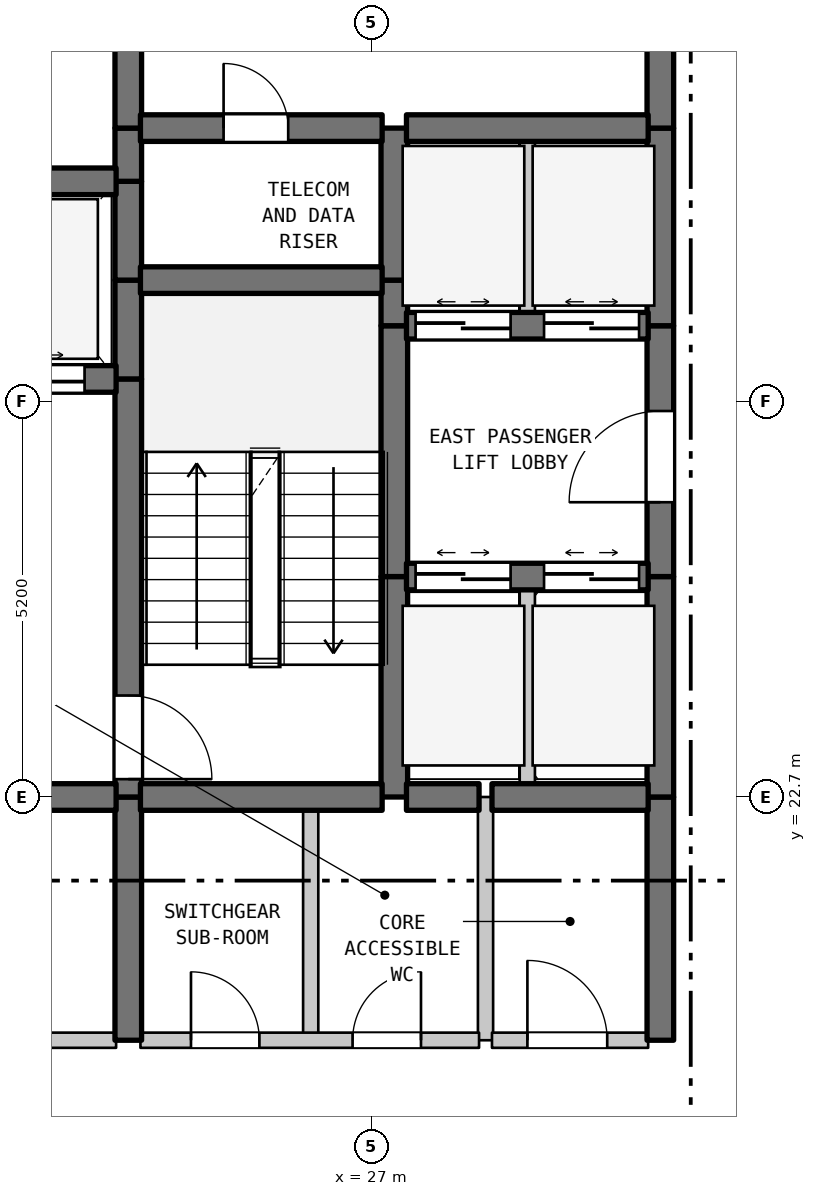
"""IFC4 building model, lengths in metres.
Left out: names, types, materials, properties, quantities, classifications, styles, units other than length and angle.
Written with IfcOpenShell. Run it as: python <this file> out.ifc"""

import sys

from ifc_helpers import new_model, si_unit, direction, frame, frame_2d, origin, place, context, subcontext, project, spatial, rectangle, extrude, element, fill, save


model = new_model("IFC4")
c1 = context("Model", 3, precision=1e-05, world=origin(), true_north=direction((0.0, 1.0)))
c2 = subcontext(c1, "Body", "Model", "MODEL_VIEW")
j1 = project(units=[si_unit("LENGTHUNIT", "METRE"), si_unit("PLANEANGLEUNIT", "RADIAN")], contexts=[c1])
p1 = place(None, origin())
s1 = spatial("IfcSite", under=j1, at=p1, CompositionType="ELEMENT")
p2 = place(p1, origin())
s2 = spatial("IfcBuilding", under=s1, at=p2, CompositionType="ELEMENT")
p3 = place(p2, frame((0.0, 0.0, 155.7)))
s3 = spatial("IfcBuildingStorey", under=s2, at=p3, CompositionType="ELEMENT", Elevation=155.7)
p4 = place(p3, frame((23.8, 19.5, 0.0), z_axis=(0.0, 0.0, 1.0), x_axis=(0.0, 1.0, 0.0)))
e1 = element("IfcWall", 1, at=p4, inside=s3, PredefinedType="SHEAR", context=c2, shape_type="SweptSolid", body=[
    extrude(rectangle(XDim=3.2, YDim=0.35, at=frame_2d((1.6, 0.0))), origin(), (0.0, 0.0, 1.0), 3.28),
])
p5 = place(p3, frame((23.8, 22.7, 0.0), z_axis=(0.0, 0.0, 1.0), x_axis=(0.0, 1.0, 0.0)))
e2 = element("IfcWall", 2, at=p5, inside=s3, PredefinedType="SHEAR", context=c2, shape_type="SweptSolid", body=[
    extrude(rectangle(XDim=5.5, YDim=0.35, at=frame_2d((2.75, 0.0))), origin(), (0.0, 0.0, 1.0), 3.28),
])
p6 = place(p5, frame((0.235, 0.0, 0.0)))
e3 = element("IfcOpeningElement", 3, at=p6, cuts=e2, PredefinedType="OPENING", context=c2, shape_type="SweptSolid", body=[
    extrude(rectangle(XDim=1.1, YDim=2.15, at=frame_2d((0.55, 1.075))), frame((0.0, 0.185, 0.0), z_axis=(0.0, -1.0, 0.0), x_axis=(1.0, 0.0, 0.0)), (0.0, 0.0, 1.0), 0.37),
])
for number, where, z_axis, x_axis in (
    (4, (23.8, 28.2, 0.0), (0.0, 0.0, 1.0), (0.0, 1.0, 0.0)),
    (5, (23.8, 29.5, 0.0), (0.0, 0.0, 1.0), (0.0, 1.0, 0.0)),
):
    element("IfcWall", number, at=place(p3, frame(where, z_axis=z_axis, x_axis=x_axis)), inside=s3, PredefinedType="SHEAR", context=c2, shape_type="SweptSolid", body=[
        extrude(rectangle(XDim=1.3, YDim=0.35, at=frame_2d((0.65, 0.0))), origin(), (0.0, 0.0, 1.0), 3.28),
    ])
p7 = place(p3, frame((23.8, 30.8, 0.0), z_axis=(0.0, 0.0, 1.0), x_axis=(0.0, 1.0, 0.0)))
e6 = element("IfcWall", 6, at=p7, inside=s3, PredefinedType="SHEAR", context=c2, shape_type="SweptSolid", body=[
    extrude(rectangle(XDim=0.7, YDim=0.35, at=frame_2d((0.35, 0.0))), origin(), (0.0, 0.0, 1.0), 3.28),
])
p8 = place(p3, frame((23.8, 31.5, 0.0), z_axis=(0.0, 0.0, 1.0), x_axis=(0.0, 1.0, 0.0)))
e7 = element("IfcWall", 7, at=p8, inside=s3, PredefinedType="SHEAR", context=c2, shape_type="SweptSolid", body=[
    extrude(rectangle(XDim=3.5, YDim=0.35, at=frame_2d((1.75, 0.0))), origin(), (0.0, 0.0, 1.0), 3.28),
])
p9 = place(p8, frame((1.127, 0.0, 0.0)))
e8 = element("IfcOpeningElement", 8, at=p9, cuts=e7, PredefinedType="OPENING", context=c2, shape_type="SweptSolid", body=[
    extrude(rectangle(XDim=1.1, YDim=2.15, at=frame_2d((0.55, 1.075))), frame((0.0, 0.185, 0.0), z_axis=(0.0, -1.0, 0.0), x_axis=(1.0, 0.0, 0.0)), (0.0, 0.0, 1.0), 0.37),
])
p10 = place(p3, frame((26.2, 19.5, 0.0), z_axis=(0.0, 0.0, 1.0), x_axis=(0.0, 1.0, 0.0)))
e9 = element("IfcWall", 9, at=p10, inside=s3, PredefinedType="STANDARD", context=c2, shape_type="SweptSolid", body=[
    extrude(rectangle(XDim=3.2, YDim=0.2, at=frame_2d((1.6, 0.0))), origin(), (0.0, 0.0, 1.0), 3.28),
])
p11 = place(p3, frame((27.3, 22.7, 0.0), z_axis=(0.0, 0.0, 1.0), x_axis=(0.0, 1.0, 0.0)))
e10 = element("IfcWall", 10, at=p11, inside=s3, PredefinedType="SHEAR", context=c2, shape_type="SweptSolid", body=[
    extrude(rectangle(XDim=2.9, YDim=0.35, at=frame_2d((1.45, 0.0))), origin(), (0.0, 0.0, 1.0), 3.28),
])
p12 = place(p3, frame((27.3, 25.6, 0.0), z_axis=(0.0, 0.0, 1.0), x_axis=(0.0, 1.0, 0.0)))
e11 = element("IfcWall", 11, at=p12, inside=s3, PredefinedType="SHEAR", context=c2, shape_type="SweptSolid", body=[
    extrude(rectangle(XDim=3.3, YDim=0.35, at=frame_2d((1.65, 0.0))), origin(), (0.0, 0.0, 1.0), 3.28),
])
p13 = place(p3, frame((27.3, 28.9, 0.0), z_axis=(0.0, 0.0, 1.0), x_axis=(0.0, 1.0, 0.0)))
e12 = element("IfcWall", 12, at=p13, inside=s3, PredefinedType="SHEAR", context=c2, shape_type="SweptSolid", body=[
    extrude(rectangle(XDim=0.6, YDim=0.35, at=frame_2d((0.3, 0.0))), origin(), (0.0, 0.0, 1.0), 3.28),
])
p14 = place(p3, frame((27.3, 29.5, 0.0), z_axis=(0.0, 0.0, 1.0), x_axis=(0.0, 1.0, 0.0)))
e13 = element("IfcWall", 13, at=p14, inside=s3, PredefinedType="SHEAR", context=c2, shape_type="SweptSolid", body=[
    extrude(rectangle(XDim=2.0, YDim=0.35, at=frame_2d((1.0, 0.0))), origin(), (0.0, 0.0, 1.0), 3.28),
])
p15 = place(p3, frame((28.5, 19.5, 0.0), z_axis=(0.0, 0.0, 1.0), x_axis=(0.0, 1.0, 0.0)))
e14 = element("IfcWall", 14, at=p15, inside=s3, PredefinedType="STANDARD", context=c2, shape_type="SweptSolid", body=[
    extrude(rectangle(XDim=3.2, YDim=0.2, at=frame_2d((1.6, 0.0))), origin(), (0.0, 0.0, 1.0), 3.28),
])
p16 = place(p3, frame((29.05, 22.7, 0.0), z_axis=(0.0, 0.0, 1.0), x_axis=(0.0, 1.0, 0.0)))
e15 = element("IfcWall", 15, at=p16, inside=s3, PredefinedType="STANDARD", context=c2, shape_type="SweptSolid", body=[
    extrude(rectangle(XDim=2.9, YDim=0.2, at=frame_2d((1.45, 0.0))), origin(), (0.0, 0.0, 1.0), 3.28),
])
p17 = place(p3, frame((29.05, 28.9, 0.0), z_axis=(0.0, 0.0, 1.0), x_axis=(0.0, 1.0, 0.0)))
e16 = element("IfcWall", 16, at=p17, inside=s3, PredefinedType="STANDARD", context=c2, shape_type="SweptSolid", body=[
    extrude(rectangle(XDim=2.6, YDim=0.2, at=frame_2d((1.3, 0.0))), origin(), (0.0, 0.0, 1.0), 3.28),
])
p18 = place(p3, frame((30.8, 19.5, 0.0), z_axis=(0.0, 0.0, 1.0), x_axis=(0.0, 1.0, 0.0)))
e17 = element("IfcWall", 17, at=p18, inside=s3, PredefinedType="SHEAR", context=c2, shape_type="SweptSolid", body=[
    extrude(rectangle(XDim=3.2, YDim=0.35, at=frame_2d((1.6, 0.0))), origin(), (0.0, 0.0, 1.0), 3.28),
])
p19 = place(p3, frame((30.8, 22.7, 0.0), z_axis=(0.0, 0.0, 1.0), x_axis=(0.0, 1.0, 0.0)))
e18 = element("IfcWall", 18, at=p19, inside=s3, PredefinedType="SHEAR", context=c2, shape_type="SweptSolid", body=[
    extrude(rectangle(XDim=2.9, YDim=0.35, at=frame_2d((1.45, 0.0))), origin(), (0.0, 0.0, 1.0), 3.28),
])
p20 = place(p3, frame((30.8, 25.6, 0.0), z_axis=(0.0, 0.0, 1.0), x_axis=(0.0, 1.0, 0.0)))
e19 = element("IfcWall", 19, at=p20, inside=s3, PredefinedType="SHEAR", context=c2, shape_type="SweptSolid", body=[
    extrude(rectangle(XDim=3.3, YDim=0.35, at=frame_2d((1.65, 0.0))), origin(), (0.0, 0.0, 1.0), 3.28),
])
p21 = place(p20, frame((0.978, 0.0, 0.0)))
e20 = element("IfcOpeningElement", 20, at=p21, cuts=e19, PredefinedType="OPENING", context=c2, shape_type="SweptSolid", body=[
    extrude(rectangle(XDim=1.2, YDim=2.2, at=frame_2d((0.6, 1.1))), frame((0.0, 0.185, 0.0), z_axis=(0.0, -1.0, 0.0), x_axis=(1.0, 0.0, 0.0)), (0.0, 0.0, 1.0), 0.37),
])
p22 = place(p3, frame((30.8, 28.9, 0.0), z_axis=(0.0, 0.0, 1.0), x_axis=(0.0, 1.0, 0.0)))
e21 = element("IfcWall", 21, at=p22, inside=s3, PredefinedType="SHEAR", context=c2, shape_type="SweptSolid", body=[
    extrude(rectangle(XDim=2.6, YDim=0.35, at=frame_2d((1.3, 0.0))), origin(), (0.0, 0.0, 1.0), 3.28),
])
p23 = place(p3, frame((30.8, 31.5, 0.0), z_axis=(0.0, 0.0, 1.0), x_axis=(0.0, 1.0, 0.0)))
e22 = element("IfcWall", 22, at=p23, inside=s3, PredefinedType="SHEAR", context=c2, shape_type="SweptSolid", body=[
    extrude(rectangle(XDim=3.5, YDim=0.35, at=frame_2d((1.75, 0.0))), origin(), (0.0, 0.0, 1.0), 3.28),
])
p24 = place(p23, frame((1.15, 0.0, 0.0)))
e23 = element("IfcOpeningElement", 23, at=p24, cuts=e22, PredefinedType="OPENING", context=c2, shape_type="SweptSolid", body=[
    extrude(rectangle(XDim=1.2, YDim=2.2, at=frame_2d((0.6, 1.1))), frame((0.0, 0.185, 0.0), z_axis=(0.0, -1.0, 0.0), x_axis=(1.0, 0.0, 0.0)), (0.0, 0.0, 1.0), 0.37),
])
p25 = place(p3, frame((19.16, 19.5, 0.0), z_axis=(0.0, 0.0, 1.0), x_axis=(1.0, 0.0, 0.0)))
e24 = element("IfcWall", 24, at=p25, inside=s3, PredefinedType="STANDARD", context=c2, shape_type="SweptSolid", body=[
    extrude(rectangle(XDim=4.48, YDim=0.2, at=frame_2d((2.24, 0.0))), origin(), (0.0, 0.0, 1.0), 3.28),
])
p26 = place(p25, frame((1.64, 0.0, 0.0)))
e25 = element("IfcOpeningElement", 25, at=p26, cuts=e24, PredefinedType="OPENING", context=c2, shape_type="SweptSolid", body=[
    extrude(rectangle(XDim=1.2, YDim=2.2, at=frame_2d((0.6, 1.1))), frame((0.0, 0.11, 0.0), z_axis=(0.0, -1.0, 0.0), x_axis=(1.0, 0.0, 0.0)), (0.0, 0.0, 1.0), 0.22),
])
p27 = place(p3, frame((23.96, 19.5, 0.0), z_axis=(0.0, 0.0, 1.0), x_axis=(1.0, 0.0, 0.0)))
e26 = element("IfcWall", 26, at=p27, inside=s3, PredefinedType="STANDARD", context=c2, shape_type="SweptSolid", body=[
    extrude(rectangle(XDim=4.455, YDim=0.2, at=frame_2d((2.228, 0.0))), origin(), (0.0, 0.0, 1.0), 3.28),
])
p28 = place(p27, frame((0.665, 0.0, 0.0)))
e27 = element("IfcOpeningElement", 27, at=p28, cuts=e26, PredefinedType="OPENING", context=c2, shape_type="SweptSolid", body=[
    extrude(rectangle(XDim=0.9, YDim=2.15, at=frame_2d((0.45, 1.075))), frame((0.0, 0.11, 0.0), z_axis=(0.0, -1.0, 0.0), x_axis=(1.0, 0.0, 0.0)), (0.0, 0.0, 1.0), 0.22),
])
p29 = place(p27, frame((2.791, 0.0, 0.0)))
e28 = element("IfcOpeningElement", 28, at=p29, cuts=e26, PredefinedType="OPENING", context=c2, shape_type="SweptSolid", body=[
    extrude(rectangle(XDim=0.9, YDim=2.15, at=frame_2d((0.45, 1.075))), frame((0.0, 0.11, 0.0), z_axis=(0.0, -1.0, 0.0), x_axis=(1.0, 0.0, 0.0)), (0.0, 0.0, 1.0), 0.22),
])
p30 = place(p3, frame((28.585, 19.5, 0.0), z_axis=(0.0, 0.0, 1.0), x_axis=(1.0, 0.0, 0.0)))
e29 = element("IfcWall", 29, at=p30, inside=s3, PredefinedType="STANDARD", context=c2, shape_type="SweptSolid", body=[
    extrude(rectangle(XDim=2.055, YDim=0.2, at=frame_2d((1.027, 0.0))), origin(), (0.0, 0.0, 1.0), 3.28),
])
p31 = place(p30, frame((0.466, 0.0, 0.0)))
e30 = element("IfcOpeningElement", 30, at=p31, cuts=e29, PredefinedType="OPENING", context=c2, shape_type="SweptSolid", body=[
    extrude(rectangle(XDim=1.05, YDim=2.15, at=frame_2d((0.525, 1.075))), frame((0.0, 0.11, 0.0), z_axis=(0.0, -1.0, 0.0), x_axis=(1.0, 0.0, 0.0)), (0.0, 0.0, 1.0), 0.22),
])
p32 = place(p3, frame((19.16, 22.7, 0.0), z_axis=(0.0, 0.0, 1.0), x_axis=(1.0, 0.0, 0.0)))
e31 = element("IfcWall", 31, at=p32, inside=s3, PredefinedType="SHEAR", context=c2, shape_type="SweptSolid", body=[
    extrude(rectangle(XDim=4.48, YDim=0.35, at=frame_2d((2.24, 0.0))), origin(), (0.0, 0.0, 1.0), 3.28),
])
p33 = place(p32, frame((1.64, 0.0, 0.0)))
e32 = element("IfcOpeningElement", 32, at=p33, cuts=e31, PredefinedType="OPENING", context=c2, shape_type="SweptSolid", body=[
    extrude(rectangle(XDim=1.2, YDim=2.2, at=frame_2d((0.6, 1.1))), frame((0.0, 0.185, 0.0), z_axis=(0.0, -1.0, 0.0), x_axis=(1.0, 0.0, 0.0)), (0.0, 0.0, 1.0), 0.37),
])
p34 = place(p3, frame((23.96, 22.7, 0.0), z_axis=(0.0, 0.0, 1.0), x_axis=(1.0, 0.0, 0.0)))
e33 = element("IfcWall", 33, at=p34, inside=s3, PredefinedType="SHEAR", context=c2, shape_type="SweptSolid", body=[
    extrude(rectangle(XDim=3.18, YDim=0.35, at=frame_2d((1.59, 0.0))), origin(), (0.0, 0.0, 1.0), 3.28),
])
p35 = place(p3, frame((27.46, 22.7, 0.0), z_axis=(0.0, 0.0, 1.0), x_axis=(1.0, 0.0, 0.0)))
e34 = element("IfcWall", 34, at=p35, inside=s3, PredefinedType="SHEAR", context=c2, shape_type="SweptSolid", body=[
    extrude(rectangle(XDim=0.955, YDim=0.35, at=frame_2d((0.478, 0.0))), origin(), (0.0, 0.0, 1.0), 3.28),
])
p36 = place(p3, frame((28.585, 22.7, 0.0), z_axis=(0.0, 0.0, 1.0), x_axis=(1.0, 0.0, 0.0)))
e35 = element("IfcWall", 35, at=p36, inside=s3, PredefinedType="SHEAR", context=c2, shape_type="SweptSolid", body=[
    extrude(rectangle(XDim=2.055, YDim=0.35, at=frame_2d((1.027, 0.0))), origin(), (0.0, 0.0, 1.0), 3.28),
])
p37 = place(p3, frame((27.46, 25.6, 0.0), z_axis=(0.0, 0.0, 1.0), x_axis=(1.0, 0.0, 0.0)))
e36 = element("IfcWall", 36, at=p37, inside=s3, PredefinedType="SHEAR", context=c2, shape_type="SweptSolid", body=[
    extrude(rectangle(XDim=3.18, YDim=0.35, at=frame_2d((1.59, 0.0))), origin(), (0.0, 0.0, 1.0), 3.28),
])
p38 = place(p37, frame((0.12, 0.0, 0.0)))
e37 = element("IfcOpeningElement", 37, at=p38, cuts=e36, PredefinedType="OPENING", context=c2, shape_type="SweptSolid", body=[
    extrude(rectangle(XDim=1.25, YDim=2.2, at=frame_2d((0.625, 1.1))), frame((0.0, 0.185, 0.0), z_axis=(0.0, -1.0, 0.0), x_axis=(1.0, 0.0, 0.0)), (0.0, 0.0, 1.0), 0.37),
])
p39 = place(p37, frame((1.81, 0.0, 0.0)))
e38 = element("IfcOpeningElement", 38, at=p39, cuts=e36, PredefinedType="OPENING", context=c2, shape_type="SweptSolid", body=[
    extrude(rectangle(XDim=1.25, YDim=2.2, at=frame_2d((0.625, 1.1))), frame((0.0, 0.185, 0.0), z_axis=(0.0, -1.0, 0.0), x_axis=(1.0, 0.0, 0.0)), (0.0, 0.0, 1.0), 0.37),
])
p40 = place(p3, frame((19.16, 28.2, 0.0), z_axis=(0.0, 0.0, 1.0), x_axis=(1.0, 0.0, 0.0)))
e39 = element("IfcWall", 39, at=p40, inside=s3, PredefinedType="SHEAR", context=c2, shape_type="SweptSolid", body=[
    extrude(rectangle(XDim=4.48, YDim=0.35, at=frame_2d((2.24, 0.0))), origin(), (0.0, 0.0, 1.0), 3.28),
])
p41 = place(p40, frame((0.415, 0.0, 0.0)))
e40 = element("IfcOpeningElement", 40, at=p41, cuts=e39, PredefinedType="OPENING", context=c2, shape_type="SweptSolid", body=[
    extrude(rectangle(XDim=1.25, YDim=2.2, at=frame_2d((0.625, 1.1))), frame((0.0, 0.185, 0.0), z_axis=(0.0, -1.0, 0.0), x_axis=(1.0, 0.0, 0.0)), (0.0, 0.0, 1.0), 0.37),
])
p42 = place(p40, frame((2.815, 0.0, 0.0)))
e41 = element("IfcOpeningElement", 41, at=p42, cuts=e39, PredefinedType="OPENING", context=c2, shape_type="SweptSolid", body=[
    extrude(rectangle(XDim=1.25, YDim=2.2, at=frame_2d((0.625, 1.1))), frame((0.0, 0.185, 0.0), z_axis=(0.0, -1.0, 0.0), x_axis=(1.0, 0.0, 0.0)), (0.0, 0.0, 1.0), 0.37),
])
p43 = place(p3, frame((27.46, 28.9, 0.0), z_axis=(0.0, 0.0, 1.0), x_axis=(1.0, 0.0, 0.0)))
e42 = element("IfcWall", 42, at=p43, inside=s3, PredefinedType="SHEAR", context=c2, shape_type="SweptSolid", body=[
    extrude(rectangle(XDim=3.18, YDim=0.35, at=frame_2d((1.59, 0.0))), origin(), (0.0, 0.0, 1.0), 3.28),
])
p44 = place(p43, frame((0.12, 0.0, 0.0)))
e43 = element("IfcOpeningElement", 43, at=p44, cuts=e42, PredefinedType="OPENING", context=c2, shape_type="SweptSolid", body=[
    extrude(rectangle(XDim=1.25, YDim=2.2, at=frame_2d((0.625, 1.1))), frame((0.0, 0.185, 0.0), z_axis=(0.0, -1.0, 0.0), x_axis=(1.0, 0.0, 0.0)), (0.0, 0.0, 1.0), 0.37),
])
p45 = place(p43, frame((1.81, 0.0, 0.0)))
e44 = element("IfcOpeningElement", 44, at=p45, cuts=e42, PredefinedType="OPENING", context=c2, shape_type="SweptSolid", body=[
    extrude(rectangle(XDim=1.25, YDim=2.2, at=frame_2d((0.625, 1.1))), frame((0.0, 0.185, 0.0), z_axis=(0.0, -1.0, 0.0), x_axis=(1.0, 0.0, 0.0)), (0.0, 0.0, 1.0), 0.37),
])
p46 = place(p3, frame((23.96, 29.5, 0.0), z_axis=(0.0, 0.0, 1.0), x_axis=(1.0, 0.0, 0.0)))
e45 = element("IfcWall", 45, at=p46, inside=s3, PredefinedType="SHEAR", context=c2, shape_type="SweptSolid", body=[
    extrude(rectangle(XDim=3.18, YDim=0.35, at=frame_2d((1.59, 0.0))), origin(), (0.0, 0.0, 1.0), 3.28),
])
p47 = place(p3, frame((19.16, 30.8, 0.0), z_axis=(0.0, 0.0, 1.0), x_axis=(1.0, 0.0, 0.0)))
e46 = element("IfcWall", 46, at=p47, inside=s3, PredefinedType="SHEAR", context=c2, shape_type="SweptSolid", body=[
    extrude(rectangle(XDim=4.48, YDim=0.35, at=frame_2d((2.24, 0.0))), origin(), (0.0, 0.0, 1.0), 3.28),
])
p48 = place(p3, frame((23.96, 31.5, 0.0), z_axis=(0.0, 0.0, 1.0), x_axis=(1.0, 0.0, 0.0)))
e47 = element("IfcWall", 47, at=p48, inside=s3, PredefinedType="SHEAR", context=c2, shape_type="SweptSolid", body=[
    extrude(rectangle(XDim=3.18, YDim=0.35, at=frame_2d((1.59, 0.0))), origin(), (0.0, 0.0, 1.0), 3.28),
])
p49 = place(p48, frame((1.094, 0.0, 0.0)))
e48 = element("IfcOpeningElement", 48, at=p49, cuts=e47, PredefinedType="OPENING", context=c2, shape_type="SweptSolid", body=[
    extrude(rectangle(XDim=0.85, YDim=2.1, at=frame_2d((0.425, 1.05))), frame((0.0, 0.185, 0.0), z_axis=(0.0, -1.0, 0.0), x_axis=(1.0, 0.0, 0.0)), (0.0, 0.0, 1.0), 0.37),
])
p50 = place(p3, frame((27.46, 31.5, 0.0), z_axis=(0.0, 0.0, 1.0), x_axis=(1.0, 0.0, 0.0)))
e49 = element("IfcWall", 49, at=p50, inside=s3, PredefinedType="SHEAR", context=c2, shape_type="SweptSolid", body=[
    extrude(rectangle(XDim=3.18, YDim=0.35, at=frame_2d((1.59, 0.0))), origin(), (0.0, 0.0, 1.0), 3.28),
])
p51 = place(p6, frame((1.1, 0.0, 0.0), z_axis=(0.0, 0.0, 1.0), x_axis=(-1.0, 0.0, 0.0)))
e50 = element("IfcDoor", 50, at=p51, inside=s3, OperationType="SINGLE_SWING_LEFT", PredefinedType="DOOR", context=c2, shape_type="SweptSolid", body=[
    extrude(rectangle(XDim=1.1, YDim=2.15, at=frame_2d((0.55, 1.075))), frame((0.0, 0.025, 0.0), z_axis=(0.0, -1.0, 0.0), x_axis=(1.0, 0.0, 0.0)), (0.0, 0.0, 1.0), 0.05),
])
fill(e3, e50)
p52 = place(p21, origin())
e51 = element("IfcDoor", 51, at=p52, inside=s3, OperationType="SINGLE_SWING_LEFT", PredefinedType="DOOR", context=c2, shape_type="SweptSolid", body=[
    extrude(rectangle(XDim=1.2, YDim=2.2, at=frame_2d((0.6, 1.1))), frame((0.0, 0.025, 0.0), z_axis=(0.0, -1.0, 0.0), x_axis=(1.0, 0.0, 0.0)), (0.0, 0.0, 1.0), 0.05),
])
fill(e20, e51)
p53 = place(p28, origin())
e52 = element("IfcDoor", 52, at=p53, inside=s3, OperationType="SINGLE_SWING_LEFT", PredefinedType="DOOR", context=c2, shape_type="SweptSolid", body=[
    extrude(rectangle(XDim=0.9, YDim=2.15, at=frame_2d((0.45, 1.075))), frame((0.0, 0.025, 0.0), z_axis=(0.0, -1.0, 0.0), x_axis=(1.0, 0.0, 0.0)), (0.0, 0.0, 1.0), 0.05),
])
fill(e27, e52)
p54 = place(p29, origin())
e53 = element("IfcDoor", 53, at=p54, inside=s3, OperationType="SINGLE_SWING_RIGHT", PredefinedType="DOOR", context=c2, shape_type="SweptSolid", body=[
    extrude(rectangle(XDim=0.9, YDim=2.15, at=frame_2d((0.45, 1.075))), frame((0.0, 0.025, 0.0), z_axis=(0.0, -1.0, 0.0), x_axis=(1.0, 0.0, 0.0)), (0.0, 0.0, 1.0), 0.05),
])
fill(e28, e53)
p55 = place(p31, origin())
e54 = element("IfcDoor", 54, at=p55, inside=s3, OperationType="SINGLE_SWING_LEFT", PredefinedType="DOOR", context=c2, shape_type="SweptSolid", body=[
    extrude(rectangle(XDim=1.05, YDim=2.15, at=frame_2d((0.525, 1.075))), frame((0.0, 0.025, 0.0), z_axis=(0.0, -1.0, 0.0), x_axis=(1.0, 0.0, 0.0)), (0.0, 0.0, 1.0), 0.05),
])
fill(e30, e54)
p56 = place(p38, origin())
e55 = element("IfcDoor", 55, at=p56, inside=s3, OperationType="DOUBLE_DOOR_SLIDING", PredefinedType="DOOR", context=c2, shape_type="SweptSolid", body=[
    extrude(rectangle(XDim=1.25, YDim=2.2, at=frame_2d((0.625, 1.1))), frame((0.0, 0.025, 0.0), z_axis=(0.0, -1.0, 0.0), x_axis=(1.0, 0.0, 0.0)), (0.0, 0.0, 1.0), 0.05),
])
fill(e37, e55)
p57 = place(p39, origin())
e56 = element("IfcDoor", 56, at=p57, inside=s3, OperationType="DOUBLE_DOOR_SLIDING", PredefinedType="DOOR", context=c2, shape_type="SweptSolid", body=[
    extrude(rectangle(XDim=1.25, YDim=2.2, at=frame_2d((0.625, 1.1))), frame((0.0, 0.025, 0.0), z_axis=(0.0, -1.0, 0.0), x_axis=(1.0, 0.0, 0.0)), (0.0, 0.0, 1.0), 0.05),
])
fill(e38, e56)
p58 = place(p42, origin())
e57 = element("IfcDoor", 57, at=p58, inside=s3, OperationType="DOUBLE_DOOR_SLIDING", PredefinedType="DOOR", context=c2, shape_type="SweptSolid", body=[
    extrude(rectangle(XDim=1.25, YDim=2.2, at=frame_2d((0.625, 1.1))), frame((0.0, 0.025, 0.0), z_axis=(0.0, -1.0, 0.0), x_axis=(1.0, 0.0, 0.0)), (0.0, 0.0, 1.0), 0.05),
])
fill(e41, e57)
p59 = place(p44, origin())
e58 = element("IfcDoor", 58, at=p59, inside=s3, OperationType="DOUBLE_DOOR_SLIDING", PredefinedType="DOOR", context=c2, shape_type="SweptSolid", body=[
    extrude(rectangle(XDim=1.25, YDim=2.2, at=frame_2d((0.625, 1.1))), frame((0.0, 0.025, 0.0), z_axis=(0.0, -1.0, 0.0), x_axis=(1.0, 0.0, 0.0)), (0.0, 0.0, 1.0), 0.05),
])
fill(e43, e58)
p60 = place(p45, origin())
e59 = element("IfcDoor", 59, at=p60, inside=s3, OperationType="DOUBLE_DOOR_SLIDING", PredefinedType="DOOR", context=c2, shape_type="SweptSolid", body=[
    extrude(rectangle(XDim=1.25, YDim=2.2, at=frame_2d((0.625, 1.1))), frame((0.0, 0.025, 0.0), z_axis=(0.0, -1.0, 0.0), x_axis=(1.0, 0.0, 0.0)), (0.0, 0.0, 1.0), 0.05),
])
fill(e44, e59)
p61 = place(p49, origin())
e60 = element("IfcDoor", 60, at=p61, inside=s3, OperationType="SINGLE_SWING_LEFT", PredefinedType="DOOR", context=c2, shape_type="SweptSolid", body=[
    extrude(rectangle(XDim=0.85, YDim=2.1, at=frame_2d((0.425, 1.05))), frame((0.0, 0.025, 0.0), z_axis=(0.0, -1.0, 0.0), x_axis=(1.0, 0.0, 0.0)), (0.0, 0.0, 1.0), 0.05),
])
fill(e48, e60)
save(model, sys.argv[1])
